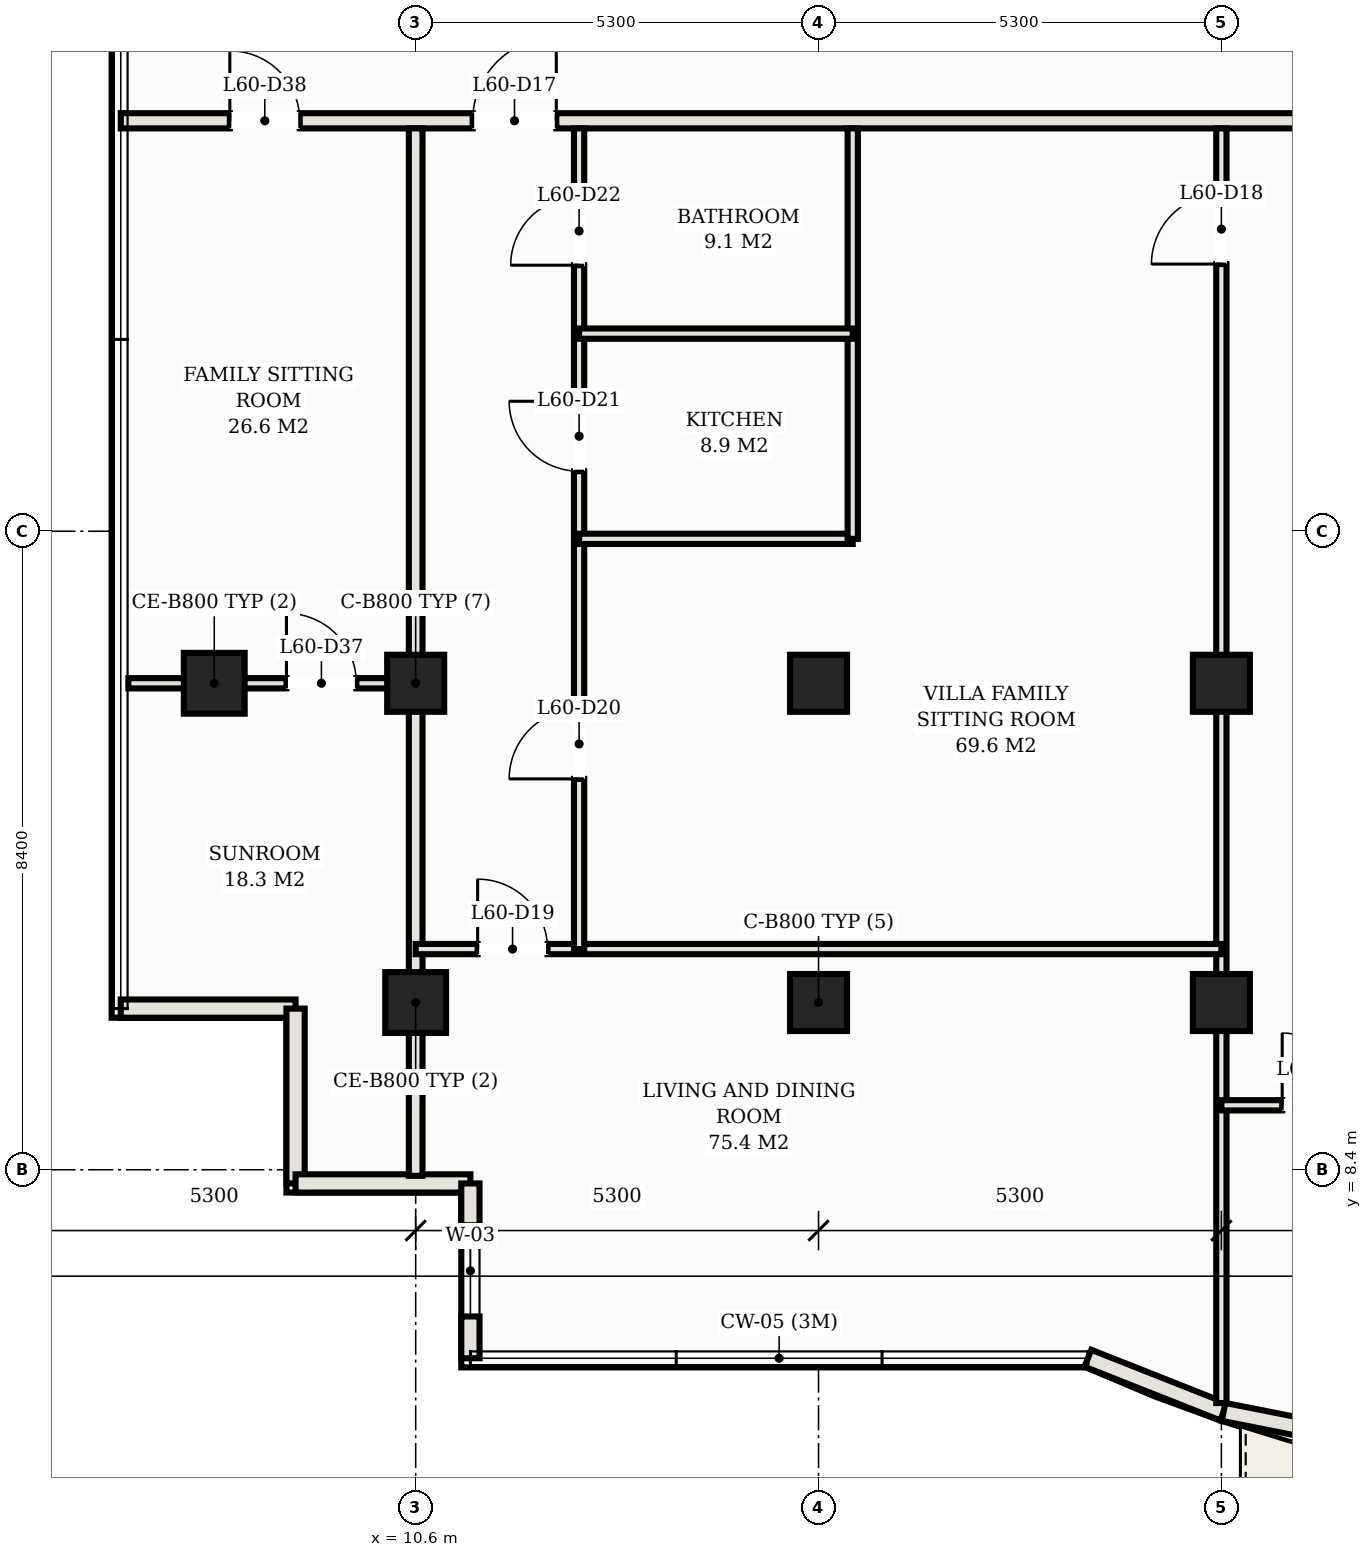
"""IFC4 building model, lengths in metres.
Left out: names, types, materials, properties, quantities, classifications, styles, units other than length and angle.
Written with IfcOpenShell. Run it as: python <this file> out.ifc"""

import sys

from ifc_helpers import new_model, si_unit, direction, frame, frame_2d, origin, origin_2d, place, context, subcontext, project, spatial, rectangle, hollow_rectangle, extrude, element, fill, save


model = new_model("IFC4")
c1 = context("Model", 3, precision=1e-05, world=origin(), true_north=direction((0.0, 1.0)))
c2 = subcontext(c1, "Body", "Model", "MODEL_VIEW")
j1 = project(units=[si_unit("LENGTHUNIT", "METRE"), si_unit("PLANEANGLEUNIT", "RADIAN")], contexts=[c1])
p1 = place(None, origin())
s1 = spatial("IfcSite", under=j1, at=p1, CompositionType="ELEMENT")
p2 = place(p1, origin())
s2 = spatial("IfcBuilding", under=s1, at=p2, CompositionType="ELEMENT")
p3 = place(p2, frame((0.0, 0.0, 219.8)))
s3 = spatial("IfcBuildingStorey", under=s2, at=p3, CompositionType="ELEMENT", Elevation=219.8)
p4 = place(p3, frame((10.6, 14.8, 0.0), z_axis=(0.0, 0.0, 1.0), x_axis=(1.0, 0.0, 0.0)))
e1 = element("IfcColumn", 1, at=p4, inside=s3, PredefinedType="COLUMN", context=c2, shape_type="SweptSolid", body=[
    extrude(hollow_rectangle(XDim=0.75, YDim=0.75, WallThickness=0.025, at=origin_2d()), origin(), (0.0, 0.0, 1.0), 3.3),
])
p5 = place(p3, frame((10.6, 10.6, 0.0), z_axis=(0.0, 0.0, 1.0), x_axis=(1.0, 0.0, 0.0)))
e2 = element("IfcColumn", 2, at=p5, inside=s3, PredefinedType="COLUMN", context=c2, shape_type="SweptSolid", body=[
    extrude(hollow_rectangle(XDim=0.8, YDim=0.8, WallThickness=0.028, at=origin_2d()), origin(), (0.0, 0.0, 1.0), 3.3),
])
for number, where, z_axis, x_axis in (
    (3, (15.9, 14.8, 0.0), (0.0, 0.0, 1.0), (1.0, 0.0, 0.0)),
    (4, (15.9, 10.6, 0.0), (0.0, 0.0, 1.0), (1.0, 0.0, 0.0)),
    (5, (21.2, 14.8, 0.0), (0.0, 0.0, 1.0), (1.0, 0.0, 0.0)),
    (6, (21.2, 10.6, 0.0), (0.0, 0.0, 1.0), (1.0, 0.0, 0.0)),
):
    element("IfcColumn", number, at=place(p3, frame(where, z_axis=z_axis, x_axis=x_axis)), inside=s3, PredefinedType="COLUMN", context=c2, shape_type="SweptSolid", body=[
        extrude(hollow_rectangle(XDim=0.75, YDim=0.75, WallThickness=0.025, at=origin_2d()), origin(), (0.0, 0.0, 1.0), 3.3),
    ])
p6 = place(p3, frame((7.95, 14.8, 0.0), z_axis=(0.0, 0.0, 1.0), x_axis=(1.0, 0.0, 0.0)))
e7 = element("IfcColumn", 7, at=p6, inside=s3, PredefinedType="COLUMN", context=c2, shape_type="SweptSolid", body=[
    extrude(hollow_rectangle(XDim=0.8, YDim=0.8, WallThickness=0.028, at=origin_2d()), origin(), (0.0, 0.0, 1.0), 3.3),
])
for number, where, z_axis, x_axis in (
    (8, (6.72, 10.52, 0.0), (0.0, 0.0, 1.0), (1.0, 0.0, 0.0)),
    (9, (9.02, 10.52, 0.0), (0.0, 0.0, 1.0), (0.0, -1.0, 0.0)),
    (10, (9.02, 8.22, 0.0), (0.0, 0.0, 1.0), (1.0, 0.0, 0.0)),
):
    element("IfcWall", number, at=place(p3, frame(where, z_axis=z_axis, x_axis=x_axis)), inside=s3, PredefinedType="SOLIDWALL", context=c2, shape_type="SweptSolid", body=[
        extrude(rectangle(XDim=2.3, YDim=0.24, at=frame_2d((1.15, 0.0))), origin(), (0.0, 0.0, 1.0), 3.11),
    ])
p7 = place(p3, frame((11.32, 8.22, 0.0), z_axis=(0.0, 0.0, 1.0), x_axis=(0.0, -1.0, 0.0)))
e11 = element("IfcWall", 11, at=p7, inside=s3, PredefinedType="SOLIDWALL", context=c2, shape_type="SweptSolid", body=[
    extrude(rectangle(XDim=2.3, YDim=0.24, at=frame_2d((1.15, 0.0))), origin(), (0.0, 0.0, 1.0), 3.11),
])
p8 = place(p7, frame((0.55, 0.0, 0.75)))
e12 = element("IfcOpeningElement", 12, at=p8, cuts=e11, PredefinedType="OPENING", context=c2, shape_type="SweptSolid", body=[
    extrude(rectangle(XDim=1.2, YDim=1.5, at=frame_2d((0.6, 0.75))), frame((0.0, 0.13, 0.0), z_axis=(0.0, -1.0, 0.0), x_axis=(1.0, 0.0, 0.0)), (0.0, 0.0, 1.0), 0.26),
])
p9 = place(p3, frame((19.444, 5.92, 0.0), z_axis=(0.0, 0.0, 1.0), x_axis=(0.92993442177, -0.367725401906, 0.0)))
e13 = element("IfcWall", 13, at=p9, inside=s3, PredefinedType="SOLIDWALL", context=c2, shape_type="SweptSolid", body=[
    extrude(rectangle(XDim=1.919, YDim=0.24, at=frame_2d((0.96, 0.0))), origin(), (0.0, 0.0, 1.0), 3.11),
])
p10 = place(p3, frame((21.229, 5.214, 0.0), z_axis=(0.0, 0.0, 1.0), x_axis=(0.980985349685, -0.194081796425, 0.0)))
e14 = element("IfcWall", 14, at=p10, inside=s3, PredefinedType="SOLIDWALL", context=c2, shape_type="SweptSolid", body=[
    extrude(rectangle(XDim=4.478, YDim=0.24, at=frame_2d((2.239, 0.0))), origin(), (0.0, 0.0, 1.0), 3.11),
])
p11 = place(p10, frame((1.381, 0.0, 0.0)))
e15 = element("IfcOpeningElement", 15, at=p11, cuts=e14, PredefinedType="OPENING", context=c2, shape_type="SweptSolid", body=[
    extrude(rectangle(XDim=1.8, YDim=2.2, at=frame_2d((0.9, 1.1))), frame((0.0, 0.13, 0.0), z_axis=(0.0, -1.0, 0.0), x_axis=(1.0, 0.0, 0.0)), (0.0, 0.0, 1.0), 0.26),
])
p12 = place(p3, frame((6.72, 22.2, 0.0), z_axis=(0.0, 0.0, 1.0), x_axis=(1.0, 0.0, 0.0)))
e16 = element("IfcWall", 16, at=p12, inside=s3, PredefinedType="PARTITIONING", context=c2, shape_type="SweptSolid", body=[
    extrude(rectangle(XDim=39.56, YDim=0.2, at=frame_2d((19.78, 0.0))), origin(), (0.0, 0.0, 1.0), 2.43),
])
p13 = place(p12, frame((4.63, 0.0, 0.0)))
e17 = element("IfcOpeningElement", 17, at=p13, cuts=e16, PredefinedType="OPENING", context=c2, shape_type="SweptSolid", body=[
    extrude(rectangle(XDim=1.1, YDim=2.25, at=frame_2d((0.55, 1.125))), frame((0.0, 0.11, 0.0), z_axis=(0.0, -1.0, 0.0), x_axis=(1.0, 0.0, 0.0)), (0.0, 0.0, 1.0), 0.22),
])
p14 = place(p12, frame((20.53, 0.0, 0.0)))
e18 = element("IfcOpeningElement", 18, at=p14, cuts=e16, PredefinedType="OPENING", context=c2, shape_type="SweptSolid", body=[
    extrude(rectangle(XDim=1.1, YDim=2.25, at=frame_2d((0.55, 1.125))), frame((0.0, 0.11, 0.0), z_axis=(0.0, -1.0, 0.0), x_axis=(1.0, 0.0, 0.0)), (0.0, 0.0, 1.0), 0.22),
])
p15 = place(p12, frame((1.435, 0.0, 0.0)))
e19 = element("IfcOpeningElement", 19, at=p15, cuts=e16, PredefinedType="OPENING", context=c2, shape_type="SweptSolid", body=[
    extrude(rectangle(XDim=0.92, YDim=2.15, at=frame_2d((0.46, 1.075))), frame((0.0, 0.11, 0.0), z_axis=(0.0, -1.0, 0.0), x_axis=(1.0, 0.0, 0.0)), (0.0, 0.0, 1.0), 0.22),
])
p16 = place(p12, frame((37.205, 0.0, 0.0)))
e20 = element("IfcOpeningElement", 20, at=p16, cuts=e16, PredefinedType="OPENING", context=c2, shape_type="SweptSolid", body=[
    extrude(rectangle(XDim=0.92, YDim=2.15, at=frame_2d((0.46, 1.075))), frame((0.0, 0.11, 0.0), z_axis=(0.0, -1.0, 0.0), x_axis=(1.0, 0.0, 0.0)), (0.0, 0.0, 1.0), 0.22),
])
p17 = place(p3, frame((10.6, 8.32, 0.0), z_axis=(0.0, 0.0, 1.0), x_axis=(0.0, 1.0, 0.0)))
e21 = element("IfcWall", 21, at=p17, inside=s3, PredefinedType="PARTITIONING", context=c2, shape_type="SweptSolid", body=[
    extrude(rectangle(XDim=13.78, YDim=0.18, at=frame_2d((6.89, 0.0))), origin(), (0.0, 0.0, 1.0), 2.43),
])
p18 = place(p3, frame((21.2, 5.331, 0.0), z_axis=(0.0, 0.0, 1.0), x_axis=(0.0, 1.0, 0.0)))
e22 = element("IfcWall", 22, at=p18, inside=s3, PredefinedType="PARTITIONING", context=c2, shape_type="SweptSolid", body=[
    extrude(rectangle(XDim=16.769, YDim=0.135, at=frame_2d((8.385, 0.0))), origin(), (0.0, 0.0, 1.0), 2.43),
])
p19 = place(p18, frame((14.984, 0.0, 0.0)))
e23 = element("IfcOpeningElement", 23, at=p19, cuts=e22, PredefinedType="OPENING", context=c2, shape_type="SweptSolid", body=[
    extrude(rectangle(XDim=0.92, YDim=2.15, at=frame_2d((0.46, 1.075))), frame((0.0, 0.078, 0.0), z_axis=(0.0, -1.0, 0.0), x_axis=(1.0, 0.0, 0.0)), (0.0, 0.0, 1.0), 0.155),
])
p20 = place(p3, frame((10.6, 11.303, 0.0), z_axis=(0.0, 0.0, 1.0), x_axis=(1.0, 0.0, 0.0)))
e24 = element("IfcWall", 24, at=p20, inside=s3, PredefinedType="PARTITIONING", context=c2, shape_type="SweptSolid", body=[
    extrude(rectangle(XDim=10.6, YDim=0.135, at=frame_2d((5.3, 0.0))), origin(), (0.0, 0.0, 1.0), 2.43),
])
p21 = place(p20, frame((0.815, 0.0, 0.0)))
e25 = element("IfcOpeningElement", 25, at=p21, cuts=e24, PredefinedType="OPENING", context=c2, shape_type="SweptSolid", body=[
    extrude(rectangle(XDim=0.92, YDim=2.15, at=frame_2d((0.46, 1.075))), frame((0.0, 0.078, 0.0), z_axis=(0.0, -1.0, 0.0), x_axis=(1.0, 0.0, 0.0)), (0.0, 0.0, 1.0), 0.155),
])
p22 = place(p3, frame((12.75, 11.303, 0.0), z_axis=(0.0, 0.0, 1.0), x_axis=(0.0, 1.0, 0.0)))
e26 = element("IfcWall", 26, at=p22, inside=s3, PredefinedType="PARTITIONING", context=c2, shape_type="SweptSolid", body=[
    extrude(rectangle(XDim=10.797, YDim=0.135, at=frame_2d((5.398, 0.0))), origin(), (0.0, 0.0, 1.0), 2.43),
])
p23 = place(p22, frame((2.239, 0.0, 0.0)))
e27 = element("IfcOpeningElement", 27, at=p23, cuts=e26, PredefinedType="OPENING", context=c2, shape_type="SweptSolid", body=[
    extrude(rectangle(XDim=0.92, YDim=2.15, at=frame_2d((0.46, 1.075))), frame((0.0, 0.078, 0.0), z_axis=(0.0, -1.0, 0.0), x_axis=(1.0, 0.0, 0.0)), (0.0, 0.0, 1.0), 0.155),
])
p24 = place(p22, frame((6.287, 0.0, 0.0)))
e28 = element("IfcOpeningElement", 28, at=p24, cuts=e26, PredefinedType="OPENING", context=c2, shape_type="SweptSolid", body=[
    extrude(rectangle(XDim=0.92, YDim=2.15, at=frame_2d((0.46, 1.075))), frame((0.0, 0.078, 0.0), z_axis=(0.0, -1.0, 0.0), x_axis=(1.0, 0.0, 0.0)), (0.0, 0.0, 1.0), 0.155),
])
p25 = place(p22, frame((8.997, 0.0, 0.0)))
e29 = element("IfcOpeningElement", 29, at=p25, cuts=e26, PredefinedType="OPENING", context=c2, shape_type="SweptSolid", body=[
    extrude(rectangle(XDim=0.9, YDim=2.15, at=frame_2d((0.45, 1.075))), frame((0.0, 0.078, 0.0), z_axis=(0.0, -1.0, 0.0), x_axis=(1.0, 0.0, 0.0)), (0.0, 0.0, 1.0), 0.155),
])
p26 = place(p3, frame((12.75, 16.7, 0.0), z_axis=(0.0, 0.0, 1.0), x_axis=(1.0, 0.0, 0.0)))
e30 = element("IfcWall", 30, at=p26, inside=s3, PredefinedType="PARTITIONING", context=c2, shape_type="SweptSolid", body=[
    extrude(rectangle(XDim=3.6, YDim=0.135, at=frame_2d((1.8, 0.0))), origin(), (0.0, 0.0, 1.0), 2.43),
])
p27 = place(p3, frame((16.35, 16.7, 0.0), z_axis=(0.0, 0.0, 1.0), x_axis=(0.0, 1.0, 0.0)))
e31 = element("IfcWall", 31, at=p27, inside=s3, PredefinedType="PARTITIONING", context=c2, shape_type="SweptSolid", body=[
    extrude(rectangle(XDim=5.4, YDim=0.135, at=frame_2d((2.7, 0.0))), origin(), (0.0, 0.0, 1.0), 2.43),
])
p28 = place(p3, frame((12.75, 19.4, 0.0), z_axis=(0.0, 0.0, 1.0), x_axis=(1.0, 0.0, 0.0)))
e32 = element("IfcWall", 32, at=p28, inside=s3, PredefinedType="PARTITIONING", context=c2, shape_type="SweptSolid", body=[
    extrude(rectangle(XDim=3.6, YDim=0.135, at=frame_2d((1.8, 0.0))), origin(), (0.0, 0.0, 1.0), 2.43),
])
p29 = place(p3, frame((21.2, 9.248, 0.0), z_axis=(0.0, 0.0, 1.0), x_axis=(1.0, 0.0, 0.0)))
e33 = element("IfcWall", 33, at=p29, inside=s3, PredefinedType="PARTITIONING", context=c2, shape_type="SweptSolid", body=[
    extrude(rectangle(XDim=5.3, YDim=0.135, at=frame_2d((2.65, 0.0))), origin(), (0.0, 0.0, 1.0), 2.43),
])
p30 = place(p29, frame((0.8, 0.0, 0.0)))
e34 = element("IfcOpeningElement", 34, at=p30, cuts=e33, PredefinedType="OPENING", context=c2, shape_type="SweptSolid", body=[
    extrude(rectangle(XDim=0.95, YDim=2.15, at=frame_2d((0.475, 1.075))), frame((0.0, 0.078, 0.0), z_axis=(0.0, -1.0, 0.0), x_axis=(1.0, 0.0, 0.0)), (0.0, 0.0, 1.0), 0.155),
])
p31 = place(p29, frame((3.275, 0.0, 0.0)))
e35 = element("IfcOpeningElement", 35, at=p31, cuts=e33, PredefinedType="OPENING", context=c2, shape_type="SweptSolid", body=[
    extrude(rectangle(XDim=0.9, YDim=2.15, at=frame_2d((0.45, 1.075))), frame((0.0, 0.078, 0.0), z_axis=(0.0, -1.0, 0.0), x_axis=(1.0, 0.0, 0.0)), (0.0, 0.0, 1.0), 0.155),
])
p32 = place(p3, frame((6.82, 14.8, 0.0), z_axis=(0.0, 0.0, 1.0), x_axis=(1.0, 0.0, 0.0)))
e36 = element("IfcWall", 36, at=p32, inside=s3, PredefinedType="PARTITIONING", context=c2, shape_type="SweptSolid", body=[
    extrude(rectangle(XDim=3.78, YDim=0.135, at=frame_2d((1.89, 0.0))), origin(), (0.0, 0.0, 1.0), 2.43),
])
p33 = place(p32, frame((2.08, 0.0, 0.0)))
e37 = element("IfcOpeningElement", 37, at=p33, cuts=e36, PredefinedType="OPENING", context=c2, shape_type="SweptSolid", body=[
    extrude(rectangle(XDim=0.92, YDim=2.15, at=frame_2d((0.46, 1.075))), frame((0.0, 0.078, 0.0), z_axis=(0.0, -1.0, 0.0), x_axis=(1.0, 0.0, 0.0)), (0.0, 0.0, 1.0), 0.155),
])
p34 = place(p8, origin())
e38 = element("IfcWindow", 38, at=p34, inside=s3, PartitioningType="SINGLE_PANEL", PredefinedType="WINDOW", context=c2, shape_type="SweptSolid", body=[
    extrude(rectangle(XDim=1.2, YDim=1.5, at=frame_2d((0.6, 0.75))), frame((0.0, 0.03, 0.0), z_axis=(0.0, -1.0, 0.0), x_axis=(1.0, 0.0, 0.0)), (0.0, 0.0, 1.0), 0.06),
])
fill(e12, e38)
p35 = place(p13, origin())
e39 = element("IfcDoor", 39, at=p35, inside=s3, OperationType="SINGLE_SWING_RIGHT", PredefinedType="DOOR", context=c2, shape_type="SweptSolid", body=[
    extrude(rectangle(XDim=1.1, YDim=2.25, at=frame_2d((0.55, 1.125))), frame((0.0, 0.025, 0.0), z_axis=(0.0, -1.0, 0.0), x_axis=(1.0, 0.0, 0.0)), (0.0, 0.0, 1.0), 0.05),
])
fill(e17, e39)
p36 = place(p19, origin())
e40 = element("IfcDoor", 40, at=p36, inside=s3, OperationType="SINGLE_SWING_LEFT", PredefinedType="DOOR", context=c2, shape_type="SweptSolid", body=[
    extrude(rectangle(XDim=0.92, YDim=2.15, at=frame_2d((0.46, 1.075))), frame((0.0, 0.025, 0.0), z_axis=(0.0, -1.0, 0.0), x_axis=(1.0, 0.0, 0.0)), (0.0, 0.0, 1.0), 0.05),
])
fill(e23, e40)
p37 = place(p21, origin())
e41 = element("IfcDoor", 41, at=p37, inside=s3, OperationType="SINGLE_SWING_LEFT", PredefinedType="DOOR", context=c2, shape_type="SweptSolid", body=[
    extrude(rectangle(XDim=0.92, YDim=2.15, at=frame_2d((0.46, 1.075))), frame((0.0, 0.025, 0.0), z_axis=(0.0, -1.0, 0.0), x_axis=(1.0, 0.0, 0.0)), (0.0, 0.0, 1.0), 0.05),
])
fill(e25, e41)
p38 = place(p23, origin())
e42 = element("IfcDoor", 42, at=p38, inside=s3, OperationType="SINGLE_SWING_LEFT", PredefinedType="DOOR", context=c2, shape_type="SweptSolid", body=[
    extrude(rectangle(XDim=0.92, YDim=2.15, at=frame_2d((0.46, 1.075))), frame((0.0, 0.025, 0.0), z_axis=(0.0, -1.0, 0.0), x_axis=(1.0, 0.0, 0.0)), (0.0, 0.0, 1.0), 0.05),
])
fill(e27, e42)
p39 = place(p24, origin())
e43 = element("IfcDoor", 43, at=p39, inside=s3, OperationType="SINGLE_SWING_RIGHT", PredefinedType="DOOR", context=c2, shape_type="SweptSolid", body=[
    extrude(rectangle(XDim=0.92, YDim=2.15, at=frame_2d((0.46, 1.075))), frame((0.0, 0.025, 0.0), z_axis=(0.0, -1.0, 0.0), x_axis=(1.0, 0.0, 0.0)), (0.0, 0.0, 1.0), 0.05),
])
fill(e28, e43)
p40 = place(p25, origin())
e44 = element("IfcDoor", 44, at=p40, inside=s3, OperationType="SINGLE_SWING_LEFT", PredefinedType="DOOR", context=c2, shape_type="SweptSolid", body=[
    extrude(rectangle(XDim=0.9, YDim=2.15, at=frame_2d((0.45, 1.075))), frame((0.0, 0.025, 0.0), z_axis=(0.0, -1.0, 0.0), x_axis=(1.0, 0.0, 0.0)), (0.0, 0.0, 1.0), 0.05),
])
fill(e29, e44)
p41 = place(p30, origin())
e45 = element("IfcDoor", 45, at=p41, inside=s3, OperationType="SINGLE_SWING_LEFT", PredefinedType="DOOR", context=c2, shape_type="SweptSolid", body=[
    extrude(rectangle(XDim=0.95, YDim=2.15, at=frame_2d((0.475, 1.075))), frame((0.0, 0.025, 0.0), z_axis=(0.0, -1.0, 0.0), x_axis=(1.0, 0.0, 0.0)), (0.0, 0.0, 1.0), 0.05),
])
fill(e34, e45)
p42 = place(p33, origin())
e46 = element("IfcDoor", 46, at=p42, inside=s3, OperationType="SINGLE_SWING_LEFT", PredefinedType="DOOR", context=c2, shape_type="SweptSolid", body=[
    extrude(rectangle(XDim=0.92, YDim=2.15, at=frame_2d((0.46, 1.075))), frame((0.0, 0.025, 0.0), z_axis=(0.0, -1.0, 0.0), x_axis=(1.0, 0.0, 0.0)), (0.0, 0.0, 1.0), 0.05),
])
fill(e37, e46)
p43 = place(p15, origin())
e47 = element("IfcDoor", 47, at=p43, inside=s3, OperationType="SINGLE_SWING_LEFT", PredefinedType="DOOR", context=c2, shape_type="SweptSolid", body=[
    extrude(rectangle(XDim=0.92, YDim=2.15, at=frame_2d((0.46, 1.075))), frame((0.0, 0.025, 0.0), z_axis=(0.0, -1.0, 0.0), x_axis=(1.0, 0.0, 0.0)), (0.0, 0.0, 1.0), 0.05),
])
fill(e19, e47)
save(model, sys.argv[1])
